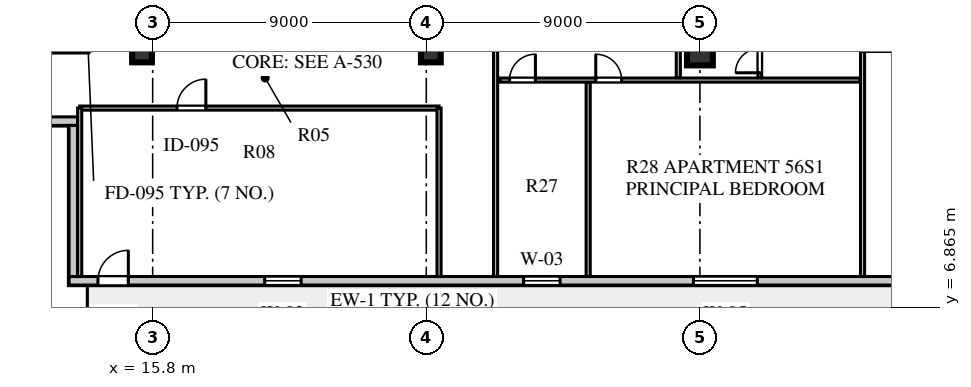
"""IFC4 building model, lengths in metres.
Left out: names, types, materials, properties, quantities, classifications, styles, units other than length and angle.
Written with IfcOpenShell. Run it as: python <this file> out.ifc"""

import sys

from ifc_helpers import new_model, si_unit, direction, frame, frame_2d, origin, origin_2d, place, context, subcontext, project, spatial, rectangle, extrude, element, fill, save


model = new_model("IFC4")
c1 = context("Model", 3, precision=1e-05, world=origin(), true_north=direction((0.0, 1.0)))
c2 = subcontext(c1, "Body", "Model", "MODEL_VIEW")
j1 = project(units=[si_unit("LENGTHUNIT", "METRE"), si_unit("PLANEANGLEUNIT", "RADIAN")], contexts=[c1])
p1 = place(None, origin())
s1 = spatial("IfcSite", under=j1, at=p1, CompositionType="ELEMENT")
p2 = place(p1, origin())
s2 = spatial("IfcBuilding", under=s1, at=p2, CompositionType="ELEMENT")
p3 = place(p2, frame((0.0, 0.0, 229.7)))
s3 = spatial("IfcBuildingStorey", under=s2, at=p3, CompositionType="ELEMENT", Elevation=229.7)
for number, where, z_axis, x_axis in (
    (1, (15.45, 15.25, 0.0), (0.0, 0.0, 1.0), (1.0, 0.0, 0.0)),
    (2, (24.95, 15.25, 0.0), (0.0, 0.0, 1.0), (1.0, 0.0, 0.0)),
):
    element("IfcColumn", number, at=place(p3, frame(where, z_axis=z_axis, x_axis=x_axis)), inside=s3, PredefinedType="COLUMN", context=c2, shape_type="SweptSolid", body=[
        extrude(rectangle(XDim=0.65, YDim=0.65, at=origin_2d()), origin(), (0.0, 0.0, 1.0), 3.66),
    ])
p4 = place(p3, frame((33.8, 15.25, 0.0), z_axis=(0.0, 0.0, 1.0), x_axis=(1.0, 0.0, 0.0)))
e3 = element("IfcColumn", 3, at=p4, inside=s3, PredefinedType="COLUMN", context=c2, shape_type="SweptSolid", body=[
    extrude(rectangle(XDim=0.85, YDim=0.85, at=origin_2d()), origin(), (0.0, 0.0, 1.0), 3.66),
])
p5 = place(p3, frame((13.05, 7.74, 0.0), z_axis=(0.0, 0.0, 1.0), x_axis=(1.0, 0.0, 0.0)))
e4 = element("IfcWall", 4, at=p5, inside=s3, PredefinedType="STANDARD", context=c2, shape_type="SweptSolid", body=[
    extrude(rectangle(XDim=32.5, YDim=0.28, at=frame_2d((16.25, 0.0))), origin(), (0.0, 0.0, 1.0), 3.66),
])
p6 = place(p5, frame((0.95, 0.0, 0.0)))
e5 = element("IfcOpeningElement", 5, at=p6, cuts=e4, PredefinedType="OPENING", context=c2, shape_type="SweptSolid", body=[
    extrude(rectangle(XDim=1.0, YDim=2.05, at=frame_2d((0.5, 1.025))), frame((0.0, 0.15, 0.0), z_axis=(0.0, -1.0, 0.0), x_axis=(1.0, 0.0, 0.0)), (0.0, 0.0, 1.0), 0.3),
])
p7 = place(p5, frame((6.435, 0.0, 0.8)))
e6 = element("IfcOpeningElement", 6, at=p7, cuts=e4, PredefinedType="OPENING", context=c2, shape_type="SweptSolid", body=[
    extrude(rectangle(XDim=1.2, YDim=1.75, at=frame_2d((0.6, 0.875))), frame((0.0, 0.15, 0.0), z_axis=(0.0, -1.0, 0.0), x_axis=(1.0, 0.0, 0.0)), (0.0, 0.0, 1.0), 0.3),
])
p8 = place(p5, frame((14.952, 0.0, 0.8)))
e7 = element("IfcOpeningElement", 7, at=p8, cuts=e4, PredefinedType="OPENING", context=c2, shape_type="SweptSolid", body=[
    extrude(rectangle(XDim=1.2, YDim=1.75, at=frame_2d((0.6, 0.875))), frame((0.0, 0.15, 0.0), z_axis=(0.0, -1.0, 0.0), x_axis=(1.0, 0.0, 0.0)), (0.0, 0.0, 1.0), 0.3),
])
p9 = place(p5, frame((20.538, 0.0, 0.8)))
e8 = element("IfcOpeningElement", 8, at=p9, cuts=e4, PredefinedType="OPENING", context=c2, shape_type="SweptSolid", body=[
    extrude(rectangle(XDim=2.1, YDim=1.95, at=frame_2d((1.05, 0.975))), frame((0.0, 0.15, 0.0), z_axis=(0.0, -1.0, 0.0), x_axis=(1.0, 0.0, 0.0)), (0.0, 0.0, 1.0), 0.3),
])
p10 = place(p5, frame((28.57, 0.0, 0.8)))
e9 = element("IfcOpeningElement", 9, at=p10, cuts=e4, PredefinedType="OPENING", context=c2, shape_type="SweptSolid", body=[
    extrude(rectangle(XDim=1.35, YDim=1.9, at=frame_2d((0.675, 0.95))), frame((0.0, 0.15, 0.0), z_axis=(0.0, -1.0, 0.0), x_axis=(1.0, 0.0, 0.0)), (0.0, 0.0, 1.0), 0.3),
])
p11 = place(p3, frame((7.8, 12.99, 0.0), z_axis=(0.0, 0.0, 1.0), x_axis=(1.0, 0.0, 0.0)))
e10 = element("IfcWall", 10, at=p11, inside=s3, PredefinedType="STANDARD", context=c2, shape_type="SweptSolid", body=[
    extrude(rectangle(XDim=5.53, YDim=0.28, at=frame_2d((2.765, 0.0))), origin(), (0.0, 0.0, 1.0), 3.66),
])
p12 = place(p3, frame((13.19, 12.85, 0.0), z_axis=(0.0, 0.0, 1.0), x_axis=(0.0, -1.0, 0.0)))
e11 = element("IfcWall", 11, at=p12, inside=s3, PredefinedType="STANDARD", context=c2, shape_type="SweptSolid", body=[
    extrude(rectangle(XDim=4.97, YDim=0.28, at=frame_2d((2.485, 0.0))), origin(), (0.0, 0.0, 1.0), 3.66),
])
p13 = place(p3, frame((27.08, 7.88, 0.0), z_axis=(0.0, 0.0, 1.0), x_axis=(0.0, 1.0, 0.0)))
e12 = element("IfcWall", 12, at=p13, inside=s3, PredefinedType="PARTITIONING", context=c2, shape_type="SweptSolid", body=[
    extrude(rectangle(XDim=13.54, YDim=0.135, at=frame_2d((6.77, 0.0))), origin(), (0.0, 0.0, 1.0), 3.66),
])
p14 = place(p3, frame((13.4, 13.42, 0.0), z_axis=(0.0, 0.0, 1.0), x_axis=(1.0, 0.0, 0.0)))
e13 = element("IfcWall", 13, at=p14, inside=s3, PredefinedType="PARTITIONING", context=c2, shape_type="SweptSolid", body=[
    extrude(rectangle(XDim=11.82, YDim=0.135, at=frame_2d((5.91, 0.0))), origin(), (0.0, 0.0, 1.0), 3.66),
])
p15 = place(p14, frame((3.2, 0.0, 0.0)))
e14 = element("IfcOpeningElement", 14, at=p15, cuts=e13, PredefinedType="OPENING", context=c2, shape_type="SweptSolid", body=[
    extrude(rectangle(XDim=0.95, YDim=2.08, at=frame_2d((0.475, 1.04))), frame((0.0, 0.078, 0.0), z_axis=(0.0, -1.0, 0.0), x_axis=(1.0, 0.0, 0.0)), (0.0, 0.0, 1.0), 0.155),
])
p16 = place(p3, frame((13.4, 7.88, 0.0), z_axis=(0.0, 0.0, 1.0), x_axis=(0.0, 1.0, 0.0)))
e15 = element("IfcWall", 15, at=p16, inside=s3, PredefinedType="PARTITIONING", context=c2, shape_type="SweptSolid", body=[
    extrude(rectangle(XDim=5.54, YDim=0.135, at=frame_2d((2.77, 0.0))), origin(), (0.0, 0.0, 1.0), 3.66),
])
p17 = place(p3, frame((25.22, 7.88, 0.0), z_axis=(0.0, 0.0, 1.0), x_axis=(0.0, 1.0, 0.0)))
e16 = element("IfcWall", 16, at=p17, inside=s3, PredefinedType="PARTITIONING", context=c2, shape_type="SweptSolid", body=[
    extrude(rectangle(XDim=5.54, YDim=0.135, at=frame_2d((2.77, 0.0))), origin(), (0.0, 0.0, 1.0), 3.21),
])
p18 = place(p3, frame((8.08, 15.3, 0.0), z_axis=(0.0, 0.0, 1.0), x_axis=(1.0, 0.0, 0.0)))
e17 = element("IfcWall", 17, at=p18, inside=s3, PredefinedType="PARTITIONING", context=c2, shape_type="SweptSolid", body=[
    extrude(rectangle(XDim=5.62, YDim=0.135, at=frame_2d((2.81, 0.0))), origin(), (0.0, 0.0, 1.0), 3.21),
])
p19 = place(p3, frame((39.15, 7.88, 0.0), z_axis=(0.0, 0.0, 1.0), x_axis=(0.0, 1.0, 0.0)))
e18 = element("IfcWall", 18, at=p19, inside=s3, PredefinedType="PARTITIONING", context=c2, shape_type="SweptSolid", body=[
    extrude(rectangle(XDim=13.54, YDim=0.135, at=frame_2d((6.77, 0.0))), origin(), (0.0, 0.0, 1.0), 3.66),
])
p20 = place(p3, frame((27.24, 14.341, 0.0), z_axis=(0.0, 0.0, 1.0), x_axis=(1.0, 0.0, 0.0)))
e19 = element("IfcWall", 19, at=p20, inside=s3, PredefinedType="PARTITIONING", context=c2, shape_type="SweptSolid", body=[
    extrude(rectangle(XDim=11.83, YDim=0.135, at=frame_2d((5.915, 0.0))), origin(), (0.0, 0.0, 1.0), 3.66),
])
p21 = place(p20, frame((0.3, 0.0, 0.0)))
e20 = element("IfcOpeningElement", 20, at=p21, cuts=e19, PredefinedType="OPENING", context=c2, shape_type="SweptSolid", body=[
    extrude(rectangle(XDim=0.85, YDim=2.08, at=frame_2d((0.425, 1.04))), frame((0.0, 0.078, 0.0), z_axis=(0.0, -1.0, 0.0), x_axis=(1.0, 0.0, 0.0)), (0.0, 0.0, 1.0), 0.155),
])
p22 = place(p20, frame((3.135, 0.0, 0.0)))
e21 = element("IfcOpeningElement", 21, at=p22, cuts=e19, PredefinedType="OPENING", context=c2, shape_type="SweptSolid", body=[
    extrude(rectangle(XDim=0.85, YDim=2.08, at=frame_2d((0.425, 1.04))), frame((0.0, 0.078, 0.0), z_axis=(0.0, -1.0, 0.0), x_axis=(1.0, 0.0, 0.0)), (0.0, 0.0, 1.0), 0.155),
])
p23 = place(p3, frame((35.77, 14.421, 0.0), z_axis=(0.0, 0.0, 1.0), x_axis=(0.0, 1.0, 0.0)))
e22 = element("IfcWall", 22, at=p23, inside=s3, PredefinedType="PLUMBINGWALL", context=c2, shape_type="SweptSolid", body=[
    extrude(rectangle(XDim=6.919, YDim=0.125, at=frame_2d((3.459, 0.0))), origin(), (0.0, 0.0, 1.0), 3.66),
])
p24 = place(p23, frame((0.16, 0.0, 0.0)))
e23 = element("IfcOpeningElement", 23, at=p24, cuts=e22, PredefinedType="OPENING", context=c2, shape_type="SweptSolid", body=[
    extrude(rectangle(XDim=0.8, YDim=2.05, at=frame_2d((0.4, 1.025))), frame((0.0, 0.073, 0.0), z_axis=(0.0, -1.0, 0.0), x_axis=(1.0, 0.0, 0.0)), (0.0, 0.0, 1.0), 0.145),
])
p25 = place(p23, frame((3.601, 0.0, 0.0)))
e24 = element("IfcOpeningElement", 24, at=p25, cuts=e22, PredefinedType="OPENING", context=c2, shape_type="SweptSolid", body=[
    extrude(rectangle(XDim=0.85, YDim=2.08, at=frame_2d((0.425, 1.04))), frame((0.0, 0.073, 0.0), z_axis=(0.0, -1.0, 0.0), x_axis=(1.0, 0.0, 0.0)), (0.0, 0.0, 1.0), 0.145),
])
p26 = place(p3, frame((33.09, 14.421, 0.0), z_axis=(0.0, 0.0, 1.0), x_axis=(0.0, 1.0, 0.0)))
e25 = element("IfcWall", 25, at=p26, inside=s3, PredefinedType="PARTITIONING", context=c2, shape_type="SweptSolid", body=[
    extrude(rectangle(XDim=6.919, YDim=0.135, at=frame_2d((3.459, 0.0))), origin(), (0.0, 0.0, 1.0), 3.66),
])
p27 = place(p26, frame((1.45, 0.0, 0.0)))
e26 = element("IfcOpeningElement", 26, at=p27, cuts=e25, PredefinedType="OPENING", context=c2, shape_type="SweptSolid", body=[
    extrude(rectangle(XDim=0.85, YDim=2.08, at=frame_2d((0.425, 1.04))), frame((0.0, 0.078, 0.0), z_axis=(0.0, -1.0, 0.0), x_axis=(1.0, 0.0, 0.0)), (0.0, 0.0, 1.0), 0.155),
])
p28 = place(p3, frame((30.125, 7.88, 0.0), z_axis=(0.0, 0.0, 1.0), x_axis=(0.0, 1.0, 0.0)))
e27 = element("IfcWall", 27, at=p28, inside=s3, PredefinedType="PARTITIONING", context=c2, shape_type="SweptSolid", body=[
    extrude(rectangle(XDim=6.381, YDim=0.135, at=frame_2d((3.19, 0.0))), origin(), (0.0, 0.0, 1.0), 3.66),
])
p29 = place(p6, frame((1.0, 0.0, 0.0), z_axis=(0.0, 0.0, 1.0), x_axis=(-1.0, 0.0, 0.0)))
e28 = element("IfcDoor", 28, at=p29, inside=s3, OperationType="SINGLE_SWING_LEFT", PredefinedType="DOOR", context=c2, shape_type="SweptSolid", body=[
    extrude(rectangle(XDim=1.0, YDim=2.05, at=frame_2d((0.5, 1.025))), frame((0.0, 0.025, 0.0), z_axis=(0.0, -1.0, 0.0), x_axis=(1.0, 0.0, 0.0)), (0.0, 0.0, 1.0), 0.05),
])
fill(e5, e28)
p30 = place(p7, origin())
e29 = element("IfcWindow", 29, at=p30, inside=s3, PartitioningType="SINGLE_PANEL", PredefinedType="WINDOW", context=c2, shape_type="SweptSolid", body=[
    extrude(rectangle(XDim=1.2, YDim=1.75, at=frame_2d((0.6, 0.875))), frame((0.0, 0.03, 0.0), z_axis=(0.0, -1.0, 0.0), x_axis=(1.0, 0.0, 0.0)), (0.0, 0.0, 1.0), 0.06),
])
fill(e6, e29)
p31 = place(p8, origin())
e30 = element("IfcWindow", 30, at=p31, inside=s3, PartitioningType="SINGLE_PANEL", PredefinedType="WINDOW", context=c2, shape_type="SweptSolid", body=[
    extrude(rectangle(XDim=1.2, YDim=1.75, at=frame_2d((0.6, 0.875))), frame((0.0, 0.03, 0.0), z_axis=(0.0, -1.0, 0.0), x_axis=(1.0, 0.0, 0.0)), (0.0, 0.0, 1.0), 0.06),
])
fill(e7, e30)
p32 = place(p9, origin())
e31 = element("IfcWindow", 31, at=p32, inside=s3, PartitioningType="SINGLE_PANEL", PredefinedType="WINDOW", context=c2, shape_type="SweptSolid", body=[
    extrude(rectangle(XDim=2.1, YDim=1.95, at=frame_2d((1.05, 0.975))), frame((0.0, 0.03, 0.0), z_axis=(0.0, -1.0, 0.0), x_axis=(1.0, 0.0, 0.0)), (0.0, 0.0, 1.0), 0.06),
])
fill(e8, e31)
p33 = place(p15, frame((0.95, 0.0, 0.0), z_axis=(0.0, 0.0, 1.0), x_axis=(-1.0, 0.0, 0.0)))
e32 = element("IfcDoor", 32, at=p33, inside=s3, OperationType="SINGLE_SWING_LEFT", PredefinedType="DOOR", context=c2, shape_type="SweptSolid", body=[
    extrude(rectangle(XDim=0.95, YDim=2.08, at=frame_2d((0.475, 1.04))), frame((0.0, 0.025, 0.0), z_axis=(0.0, -1.0, 0.0), x_axis=(1.0, 0.0, 0.0)), (0.0, 0.0, 1.0), 0.05),
])
fill(e14, e32)
p34 = place(p24, origin())
e33 = element("IfcDoor", 33, at=p34, inside=s3, OperationType="SINGLE_SWING_LEFT", PredefinedType="DOOR", context=c2, shape_type="SweptSolid", body=[
    extrude(rectangle(XDim=0.8, YDim=2.05, at=frame_2d((0.4, 1.025))), frame((0.0, 0.025, 0.0), z_axis=(0.0, -1.0, 0.0), x_axis=(1.0, 0.0, 0.0)), (0.0, 0.0, 1.0), 0.05),
])
fill(e23, e33)
p35 = place(p21, frame((0.85, 0.0, 0.0), z_axis=(0.0, 0.0, 1.0), x_axis=(-1.0, 0.0, 0.0)))
e34 = element("IfcDoor", 34, at=p35, inside=s3, OperationType="SINGLE_SWING_LEFT", PredefinedType="DOOR", context=c2, shape_type="SweptSolid", body=[
    extrude(rectangle(XDim=0.85, YDim=2.08, at=frame_2d((0.425, 1.04))), frame((0.0, 0.025, 0.0), z_axis=(0.0, -1.0, 0.0), x_axis=(1.0, 0.0, 0.0)), (0.0, 0.0, 1.0), 0.05),
])
fill(e20, e34)
p36 = place(p22, frame((0.85, 0.0, 0.0), z_axis=(0.0, 0.0, 1.0), x_axis=(-1.0, 0.0, 0.0)))
e35 = element("IfcDoor", 35, at=p36, inside=s3, OperationType="SINGLE_SWING_RIGHT", PredefinedType="DOOR", context=c2, shape_type="SweptSolid", body=[
    extrude(rectangle(XDim=0.85, YDim=2.08, at=frame_2d((0.425, 1.04))), frame((0.0, 0.025, 0.0), z_axis=(0.0, -1.0, 0.0), x_axis=(1.0, 0.0, 0.0)), (0.0, 0.0, 1.0), 0.05),
])
fill(e21, e35)
save(model, sys.argv[1])
